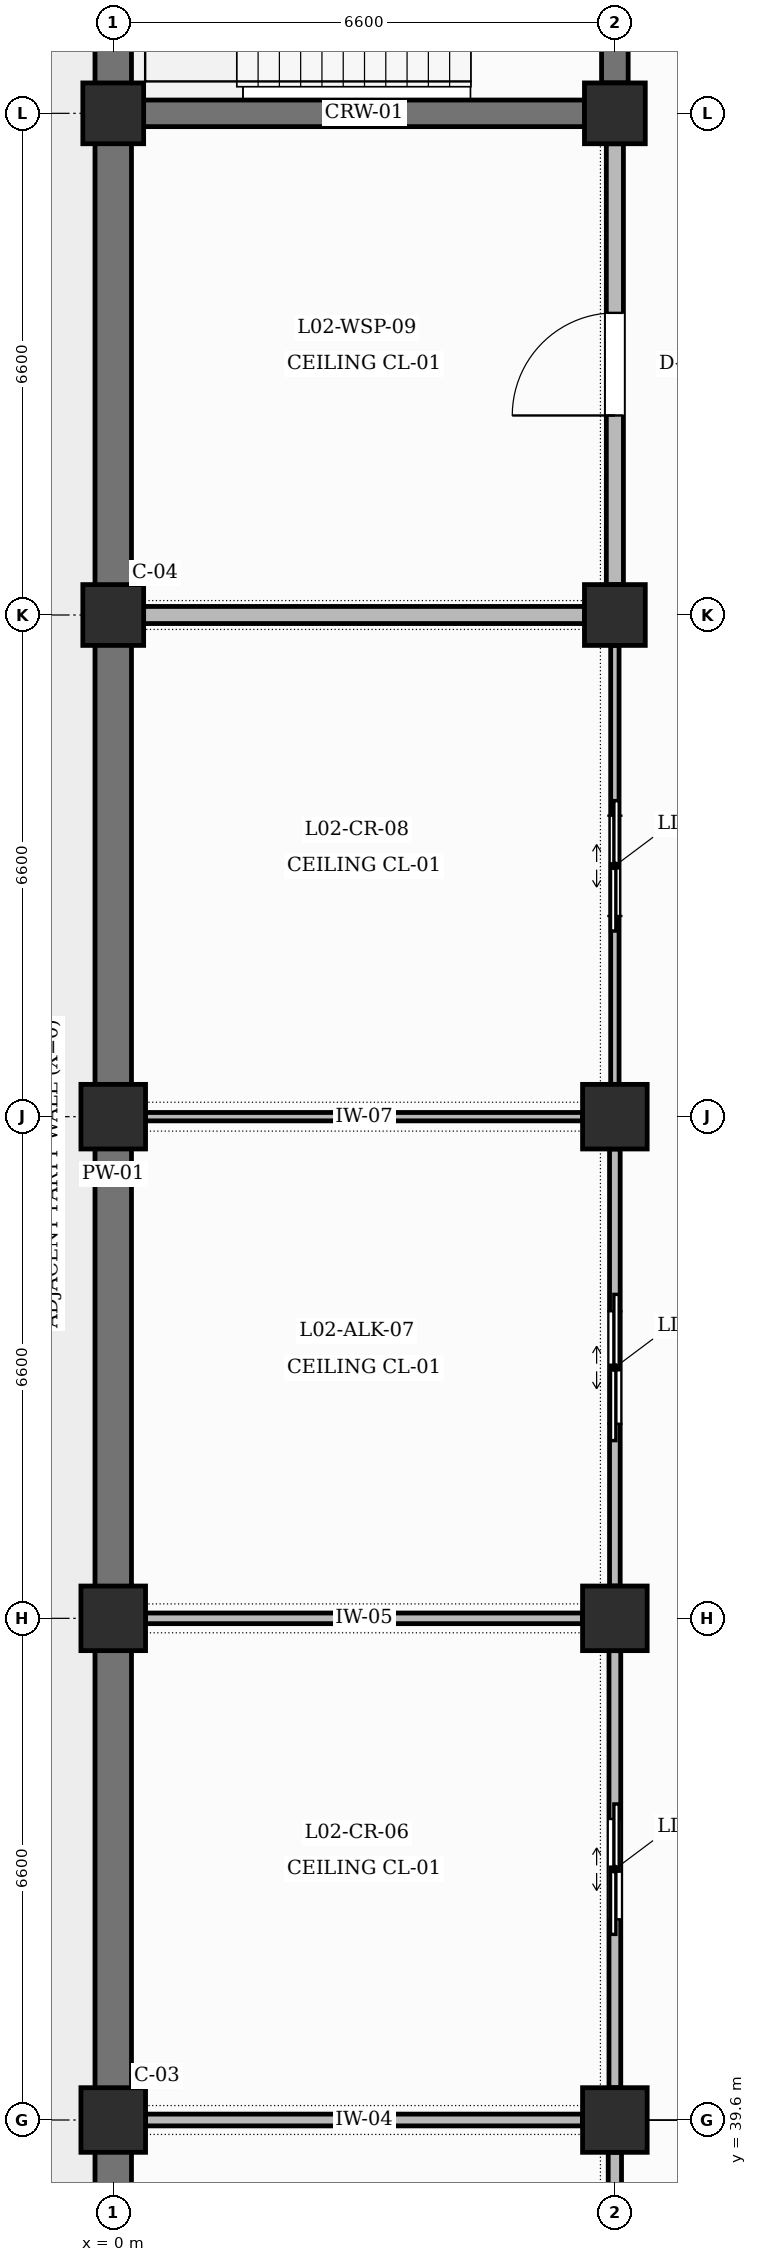
"""IFC4 building model, lengths in metres.
Left out: names, types, materials, properties, quantities, classifications, styles, units other than length and angle.
Written with IfcOpenShell. Run it as: python <this file> out.ifc"""

import sys

from ifc_helpers import new_model, si_unit, direction, frame, frame_2d, origin, origin_2d, place, context, subcontext, project, spatial, rectangle, extrude, element, fill, save


model = new_model("IFC4")
c1 = context("Model", 3, precision=1e-05, world=origin(), true_north=direction((0.0, 1.0)))
c2 = subcontext(c1, "Body", "Model", "MODEL_VIEW")
j1 = project(units=[si_unit("LENGTHUNIT", "METRE"), si_unit("PLANEANGLEUNIT", "RADIAN")], contexts=[c1])
p1 = place(None, origin())
s1 = spatial("IfcSite", under=j1, at=p1, CompositionType="ELEMENT")
p2 = place(p1, origin())
s2 = spatial("IfcBuilding", under=s1, at=p2, CompositionType="ELEMENT")
p3 = place(p2, frame((0.0, 0.0, 10.2)))
s3 = spatial("IfcBuildingStorey", under=s2, at=p3, CompositionType="ELEMENT", Elevation=10.2)
for number, where, z_axis, x_axis in (
    (1, (0.0, 39.6, 0.0), (0.0, 0.0, 1.0), (1.0, 0.0, 0.0)),
    (2, (0.0, 46.2, 0.0), (0.0, 0.0, 1.0), (1.0, 0.0, 0.0)),
    (3, (0.0, 52.8, 0.0), (0.0, 0.0, 1.0), (1.0, 0.0, 0.0)),
):
    element("IfcColumn", number, at=place(p3, frame(where, z_axis=z_axis, x_axis=x_axis)), inside=s3, PredefinedType="COLUMN", context=c2, shape_type="SweptSolid", body=[
        extrude(rectangle(XDim=0.85, YDim=0.85, at=origin_2d()), origin(), (0.0, 0.0, 1.0), 4.2),
    ])
for number, where, z_axis, x_axis in (
    (4, (0.0, 59.4, 0.0), (0.0, 0.0, 1.0), (1.0, 0.0, 0.0)),
    (5, (0.0, 66.0, 0.0), (0.0, 0.0, 1.0), (1.0, 0.0, 0.0)),
):
    element("IfcColumn", number, at=place(p3, frame(where, z_axis=z_axis, x_axis=x_axis)), inside=s3, PredefinedType="COLUMN", context=c2, shape_type="SweptSolid", body=[
        extrude(rectangle(XDim=0.8, YDim=0.8, at=origin_2d()), origin(), (0.0, 0.0, 1.0), 4.2),
    ])
for number, where, z_axis, x_axis in (
    (6, (6.6, 39.6, 0.0), (0.0, 0.0, 1.0), (1.0, 0.0, 0.0)),
    (7, (6.6, 46.2, 0.0), (0.0, 0.0, 1.0), (1.0, 0.0, 0.0)),
    (8, (6.6, 52.8, 0.0), (0.0, 0.0, 1.0), (1.0, 0.0, 0.0)),
):
    element("IfcColumn", number, at=place(p3, frame(where, z_axis=z_axis, x_axis=x_axis)), inside=s3, PredefinedType="COLUMN", context=c2, shape_type="SweptSolid", body=[
        extrude(rectangle(XDim=0.85, YDim=0.85, at=origin_2d()), origin(), (0.0, 0.0, 1.0), 4.2),
    ])
for number, where, z_axis, x_axis in (
    (9, (6.6, 59.4, 0.0), (0.0, 0.0, 1.0), (1.0, 0.0, 0.0)),
    (10, (6.6, 66.0, 0.0), (0.0, 0.0, 1.0), (1.0, 0.0, 0.0)),
):
    element("IfcColumn", number, at=place(p3, frame(where, z_axis=z_axis, x_axis=x_axis)), inside=s3, PredefinedType="COLUMN", context=c2, shape_type="SweptSolid", body=[
        extrude(rectangle(XDim=0.8, YDim=0.8, at=origin_2d()), origin(), (0.0, 0.0, 1.0), 4.2),
    ])
for number, where, z_axis, x_axis in (
    (11, (0.0, 33.425, 0.0), (0.0, 0.0, 1.0), (0.0, 1.0, 0.0)),
    (12, (0.0, 40.025, 0.0), (0.0, 0.0, 1.0), (0.0, 1.0, 0.0)),
    (13, (0.0, 46.625, 0.0), (0.0, 0.0, 1.0), (0.0, 1.0, 0.0)),
):
    element("IfcWall", number, at=place(p3, frame(where, z_axis=z_axis, x_axis=x_axis)), inside=s3, PredefinedType="SOLIDWALL", context=c2, shape_type="SweptSolid", body=[
        extrude(rectangle(XDim=5.75, YDim=0.48, at=frame_2d((2.875, 0.0))), origin(), (0.0, 0.0, 1.0), 3.25),
    ])
p4 = place(p3, frame((0.0, 53.225, 0.0), z_axis=(0.0, 0.0, 1.0), x_axis=(0.0, 1.0, 0.0)))
e14 = element("IfcWall", 14, at=p4, inside=s3, PredefinedType="SOLIDWALL", context=c2, shape_type="SweptSolid", body=[
    extrude(rectangle(XDim=5.775, YDim=0.48, at=frame_2d((2.887, 0.0))), origin(), (0.0, 0.0, 1.0), 3.25),
])
for number, where, z_axis, x_axis in (
    (15, (0.0, 59.8, 0.0), (0.0, 0.0, 1.0), (0.0, 1.0, 0.0)),
    (16, (0.0, 66.4, 0.0), (0.0, 0.0, 1.0), (0.0, 1.0, 0.0)),
):
    element("IfcWall", number, at=place(p3, frame(where, z_axis=z_axis, x_axis=x_axis)), inside=s3, PredefinedType="SOLIDWALL", context=c2, shape_type="SweptSolid", body=[
        extrude(rectangle(XDim=5.8, YDim=0.48, at=frame_2d((2.9, 0.0))), origin(), (0.0, 0.0, 1.0), 3.25),
    ])
p5 = place(p3, frame((0.4, 66.0, 0.0), z_axis=(0.0, 0.0, 1.0), x_axis=(1.0, 0.0, 0.0)))
e17 = element("IfcWall", 17, at=p5, inside=s3, PredefinedType="SHEAR", context=c2, shape_type="SweptSolid", body=[
    extrude(rectangle(XDim=5.8, YDim=0.35, at=frame_2d((2.9, 0.0))), origin(), (0.0, 0.0, 1.0), 3.0),
])
p6 = place(p3, frame((6.6, 66.4, 0.0), z_axis=(0.0, 0.0, 1.0), x_axis=(0.0, 1.0, 0.0)))
e18 = element("IfcWall", 18, at=p6, inside=s3, PredefinedType="SHEAR", context=c2, shape_type="SweptSolid", body=[
    extrude(rectangle(XDim=5.8, YDim=0.35, at=frame_2d((2.9, 0.0))), origin(), (0.0, 0.0, 1.0), 3.1),
])
p7 = place(p6, frame((2.325, 0.0, 0.0)))
e19 = element("IfcOpeningElement", 19, at=p7, cuts=e18, PredefinedType="OPENING", context=c2, shape_type="SweptSolid", body=[
    extrude(rectangle(XDim=1.15, YDim=2.2, at=frame_2d((0.575, 1.1))), frame((0.0, 0.185, 0.0), z_axis=(0.0, -1.0, 0.0), x_axis=(1.0, 0.0, 0.0)), (0.0, 0.0, 1.0), 0.37),
])
p8 = place(p3, frame((6.6, 33.425, 0.0), z_axis=(0.0, 0.0, 1.0), x_axis=(0.0, 1.0, 0.0)))
e20 = element("IfcWall", 20, at=p8, inside=s3, PredefinedType="PARTITIONING", context=c2, shape_type="SweptSolid", body=[
    extrude(rectangle(XDim=5.75, YDim=0.175, at=frame_2d((2.875, 0.0))), origin(), (0.0, 0.0, 1.0), 3.1),
])
p9 = place(p8, frame((2.135, 0.0, 0.0)))
e21 = element("IfcOpeningElement", 21, at=p9, cuts=e20, PredefinedType="OPENING", context=c2, shape_type="SweptSolid", body=[
    extrude(rectangle(XDim=1.48, YDim=2.25, at=frame_2d((0.74, 1.125))), frame((0.0, 0.097, 0.0), z_axis=(0.0, -1.0, 0.0), x_axis=(1.0, 0.0, 0.0)), (0.0, 0.0, 1.0), 0.195),
])
p10 = place(p3, frame((0.425, 39.6, 0.0), z_axis=(0.0, 0.0, 1.0), x_axis=(1.0, 0.0, 0.0)))
e22 = element("IfcWall", 22, at=p10, inside=s3, PredefinedType="PARTITIONING", context=c2, shape_type="SweptSolid", body=[
    extrude(rectangle(XDim=5.75, YDim=0.155, at=frame_2d((2.875, 0.0))), origin(), (0.0, 0.0, 1.0), 3.0),
])
p11 = place(p3, frame((6.6, 40.025, 0.0), z_axis=(0.0, 0.0, 1.0), x_axis=(0.0, 1.0, 0.0)))
e23 = element("IfcWall", 23, at=p11, inside=s3, PredefinedType="PARTITIONING", context=c2, shape_type="SweptSolid", body=[
    extrude(rectangle(XDim=5.75, YDim=0.155, at=frame_2d((2.875, 0.0))), origin(), (0.0, 0.0, 1.0), 3.1),
])
p12 = place(p11, frame((2.215, 0.0, 0.0)))
e24 = element("IfcOpeningElement", 24, at=p12, cuts=e23, PredefinedType="OPENING", context=c2, shape_type="SweptSolid", body=[
    extrude(rectangle(XDim=1.32, YDim=2.2, at=frame_2d((0.66, 1.1))), frame((0.0, 0.087, 0.0), z_axis=(0.0, -1.0, 0.0), x_axis=(1.0, 0.0, 0.0)), (0.0, 0.0, 1.0), 0.175),
])
p13 = place(p3, frame((0.425, 46.2, 0.0), z_axis=(0.0, 0.0, 1.0), x_axis=(1.0, 0.0, 0.0)))
e25 = element("IfcWall", 25, at=p13, inside=s3, PredefinedType="PARTITIONING", context=c2, shape_type="SweptSolid", body=[
    extrude(rectangle(XDim=5.75, YDim=0.14, at=frame_2d((2.875, 0.0))), origin(), (0.0, 0.0, 1.0), 3.1),
])
p14 = place(p3, frame((6.6, 46.625, 0.0), z_axis=(0.0, 0.0, 1.0), x_axis=(0.0, 1.0, 0.0)))
e26 = element("IfcWall", 26, at=p14, inside=s3, PredefinedType="PARTITIONING", context=c2, shape_type="SweptSolid", body=[
    extrude(rectangle(XDim=5.75, YDim=0.14, at=frame_2d((2.875, 0.0))), origin(), (0.0, 0.0, 1.0), 3.1),
])
p15 = place(p14, frame((2.135, 0.0, 0.0)))
e27 = element("IfcOpeningElement", 27, at=p15, cuts=e26, PredefinedType="OPENING", context=c2, shape_type="SweptSolid", body=[
    extrude(rectangle(XDim=1.48, YDim=2.25, at=frame_2d((0.74, 1.125))), frame((0.0, 0.08, 0.0), z_axis=(0.0, -1.0, 0.0), x_axis=(1.0, 0.0, 0.0)), (0.0, 0.0, 1.0), 0.16),
])
p16 = place(p3, frame((0.425, 52.8, 0.0), z_axis=(0.0, 0.0, 1.0), x_axis=(1.0, 0.0, 0.0)))
e28 = element("IfcWall", 28, at=p16, inside=s3, PredefinedType="PARTITIONING", context=c2, shape_type="SweptSolid", body=[
    extrude(rectangle(XDim=5.75, YDim=0.11, at=frame_2d((2.875, 0.0))), origin(), (0.0, 0.0, 1.0), 3.0),
])
p17 = place(p3, frame((6.6, 53.225, 0.0), z_axis=(0.0, 0.0, 1.0), x_axis=(0.0, 1.0, 0.0)))
e29 = element("IfcWall", 29, at=p17, inside=s3, PredefinedType="PARTITIONING", context=c2, shape_type="SweptSolid", body=[
    extrude(rectangle(XDim=5.775, YDim=0.11, at=frame_2d((2.887, 0.0))), origin(), (0.0, 0.0, 1.0), 3.1),
])
p18 = place(p17, frame((2.215, 0.0, 0.0)))
e30 = element("IfcOpeningElement", 30, at=p18, cuts=e29, PredefinedType="OPENING", context=c2, shape_type="SweptSolid", body=[
    extrude(rectangle(XDim=1.32, YDim=2.2, at=frame_2d((0.66, 1.1))), frame((0.0, 0.065, 0.0), z_axis=(0.0, -1.0, 0.0), x_axis=(1.0, 0.0, 0.0)), (0.0, 0.0, 1.0), 0.13),
])
p19 = place(p3, frame((0.4, 59.4, 0.0), z_axis=(0.0, 0.0, 1.0), x_axis=(1.0, 0.0, 0.0)))
e31 = element("IfcWall", 31, at=p19, inside=s3, PredefinedType="PARTITIONING", context=c2, shape_type="SweptSolid", body=[
    extrude(rectangle(XDim=5.8, YDim=0.225, at=frame_2d((2.9, 0.0))), origin(), (0.0, 0.0, 1.0), 3.1),
])
p20 = place(p3, frame((6.6, 59.8, 0.0), z_axis=(0.0, 0.0, 1.0), x_axis=(0.0, 1.0, 0.0)))
e32 = element("IfcWall", 32, at=p20, inside=s3, PredefinedType="PARTITIONING", context=c2, shape_type="SweptSolid", body=[
    extrude(rectangle(XDim=5.8, YDim=0.225, at=frame_2d((2.9, 0.0))), origin(), (0.0, 0.0, 1.0), 3.1),
])
p21 = place(p20, frame((2.225, 0.0, 0.0)))
e33 = element("IfcOpeningElement", 33, at=p21, cuts=e32, PredefinedType="OPENING", context=c2, shape_type="SweptSolid", body=[
    extrude(rectangle(XDim=1.35, YDim=2.3, at=frame_2d((0.675, 1.15))), frame((0.0, 0.123, 0.0), z_axis=(0.0, -1.0, 0.0), x_axis=(1.0, 0.0, 0.0)), (0.0, 0.0, 1.0), 0.245),
])
p22 = place(p12, origin())
e34 = element("IfcDoor", 34, at=p22, inside=s3, OperationType="DOUBLE_DOOR_SLIDING", PredefinedType="USERDEFINED", context=c2, shape_type="SweptSolid", body=[
    extrude(rectangle(XDim=1.32, YDim=2.2, at=frame_2d((0.66, 1.1))), frame((0.0, 0.025, 0.0), z_axis=(0.0, -1.0, 0.0), x_axis=(1.0, 0.0, 0.0)), (0.0, 0.0, 1.0), 0.05),
])
fill(e24, e34)
p23 = place(p15, origin())
e35 = element("IfcDoor", 35, at=p23, inside=s3, OperationType="DOUBLE_DOOR_SLIDING", PredefinedType="USERDEFINED", context=c2, shape_type="SweptSolid", body=[
    extrude(rectangle(XDim=1.48, YDim=2.25, at=frame_2d((0.74, 1.125))), frame((0.0, 0.025, 0.0), z_axis=(0.0, -1.0, 0.0), x_axis=(1.0, 0.0, 0.0)), (0.0, 0.0, 1.0), 0.05),
])
fill(e27, e35)
p24 = place(p18, origin())
e36 = element("IfcDoor", 36, at=p24, inside=s3, OperationType="DOUBLE_DOOR_SLIDING", PredefinedType="USERDEFINED", context=c2, shape_type="SweptSolid", body=[
    extrude(rectangle(XDim=1.32, YDim=2.2, at=frame_2d((0.66, 1.1))), frame((0.0, 0.025, 0.0), z_axis=(0.0, -1.0, 0.0), x_axis=(1.0, 0.0, 0.0)), (0.0, 0.0, 1.0), 0.05),
])
fill(e30, e36)
p25 = place(p21, origin())
e37 = element("IfcDoor", 37, at=p25, inside=s3, OperationType="SINGLE_SWING_LEFT", PredefinedType="DOOR", context=c2, shape_type="SweptSolid", body=[
    extrude(rectangle(XDim=1.35, YDim=2.3, at=frame_2d((0.675, 1.15))), frame((0.0, 0.025, 0.0), z_axis=(0.0, -1.0, 0.0), x_axis=(1.0, 0.0, 0.0)), (0.0, 0.0, 1.0), 0.05),
])
fill(e33, e37)
save(model, sys.argv[1])
